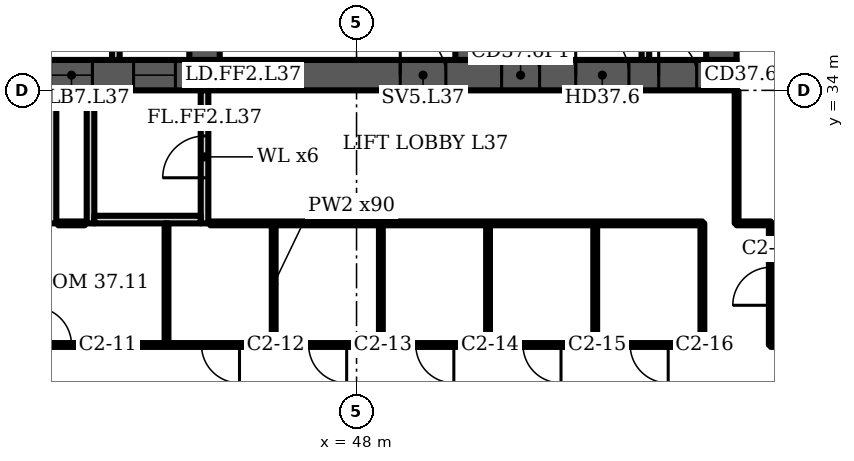
"""IFC4 building model, lengths in metres.
Left out: names, types, materials, properties, quantities, classifications, styles, units other than length and angle.
Written with IfcOpenShell. Run it as: python <this file> out.ifc"""

import sys

from ifc_helpers import new_model, si_unit, direction, frame, frame_2d, origin, place, context, subcontext, project, spatial, polyline, rectangle, outline, extrude, element, fill, save


model = new_model("IFC4")
c1 = context("Model", 3, precision=1e-05, world=origin(), true_north=direction((0.0, 1.0)))
c2 = subcontext(c1, "Body", "Model", "MODEL_VIEW")
j1 = project(units=[si_unit("LENGTHUNIT", "METRE"), si_unit("PLANEANGLEUNIT", "RADIAN")], contexts=[c1])
p1 = place(None, origin())
s1 = spatial("IfcSite", under=j1, at=p1, CompositionType="ELEMENT")
p2 = place(p1, origin())
s2 = spatial("IfcBuilding", under=s1, at=p2, CompositionType="ELEMENT")
p3 = place(p2, frame((0.0, 0.0, 155.5)))
s3 = spatial("IfcBuildingStorey", under=s2, at=p3, CompositionType="ELEMENT", Elevation=155.5)
p4 = place(p3, frame((16.0, 34.4, 0.0), z_axis=(0.0, 0.0, 1.0), x_axis=(1.0, 0.0, 0.0)))
e1 = element("IfcWall", 1, at=p4, inside=s3, PredefinedType="SHEAR", context=c2, shape_type="SweptSolid", body=[
    extrude(rectangle(XDim=42.0, YDim=0.8, at=frame_2d((21.0, 0.0))), origin(), (0.0, 0.0, 1.0), 3.6),
])
p5 = place(p4, frame((1.75, 0.0, 0.0)))
e2 = element("IfcOpeningElement", 2, at=p5, cuts=e1, PredefinedType="OPENING", context=c2, shape_type="SweptSolid", body=[
    extrude(rectangle(XDim=1.0, YDim=2.1, at=frame_2d((0.5, 1.05))), frame((0.0, 0.41, 0.0), z_axis=(0.0, -1.0, 0.0), x_axis=(1.0, 0.0, 0.0)), (0.0, 0.0, 1.0), 0.82),
])
p6 = place(p4, frame((4.65, 0.0, 0.0)))
e3 = element("IfcOpeningElement", 3, at=p6, cuts=e1, PredefinedType="OPENING", context=c2, shape_type="SweptSolid", body=[
    extrude(rectangle(XDim=1.0, YDim=2.1, at=frame_2d((0.5, 1.05))), frame((0.0, 0.41, 0.0), z_axis=(0.0, -1.0, 0.0), x_axis=(1.0, 0.0, 0.0)), (0.0, 0.0, 1.0), 0.82),
])
p7 = place(p4, frame((7.65, 0.0, 0.0)))
e4 = element("IfcOpeningElement", 4, at=p7, cuts=e1, PredefinedType="OPENING", context=c2, shape_type="SweptSolid", body=[
    extrude(rectangle(XDim=1.2, YDim=2.1, at=frame_2d((0.6, 1.05))), frame((0.0, 0.41, 0.0), z_axis=(0.0, -1.0, 0.0), x_axis=(1.0, 0.0, 0.0)), (0.0, 0.0, 1.0), 0.82),
])
p8 = place(p4, frame((14.767, 0.0, 0.0)))
e5 = element("IfcOpeningElement", 5, at=p8, cuts=e1, PredefinedType="OPENING", context=c2, shape_type="SweptSolid", body=[
    extrude(rectangle(XDim=1.1, YDim=2.1, at=frame_2d((0.55, 1.05))), frame((0.0, 0.41, 0.0), z_axis=(0.0, -1.0, 0.0), x_axis=(1.0, 0.0, 0.0)), (0.0, 0.0, 1.0), 0.82),
])
p9 = place(p4, frame((19.133, 0.0, 0.0)))
e6 = element("IfcOpeningElement", 6, at=p9, cuts=e1, PredefinedType="OPENING", context=c2, shape_type="SweptSolid", body=[
    extrude(rectangle(XDim=1.1, YDim=2.1, at=frame_2d((0.55, 1.05))), frame((0.0, 0.41, 0.0), z_axis=(0.0, -1.0, 0.0), x_axis=(1.0, 0.0, 0.0)), (0.0, 0.0, 1.0), 0.82),
])
p10 = place(p4, frame((16.8, 0.0, 0.0)))
e7 = element("IfcOpeningElement", 7, at=p10, cuts=e1, PredefinedType="OPENING", context=c2, shape_type="SweptSolid", body=[
    extrude(rectangle(XDim=1.4, YDim=2.1, at=frame_2d((0.7, 1.05))), frame((0.0, 0.41, 0.0), z_axis=(0.0, -1.0, 0.0), x_axis=(1.0, 0.0, 0.0)), (0.0, 0.0, 1.0), 0.82),
])
p11 = place(p4, frame((21.767, 0.0, 0.0)))
e8 = element("IfcOpeningElement", 8, at=p11, cuts=e1, PredefinedType="OPENING", context=c2, shape_type="SweptSolid", body=[
    extrude(rectangle(XDim=1.1, YDim=2.1, at=frame_2d((0.55, 1.05))), frame((0.0, 0.41, 0.0), z_axis=(0.0, -1.0, 0.0), x_axis=(1.0, 0.0, 0.0)), (0.0, 0.0, 1.0), 0.82),
])
p12 = place(p4, frame((23.95, 0.0, 0.0)))
e9 = element("IfcOpeningElement", 9, at=p12, cuts=e1, PredefinedType="OPENING", context=c2, shape_type="SweptSolid", body=[
    extrude(rectangle(XDim=1.1, YDim=2.1, at=frame_2d((0.55, 1.05))), frame((0.0, 0.41, 0.0), z_axis=(0.0, -1.0, 0.0), x_axis=(1.0, 0.0, 0.0)), (0.0, 0.0, 1.0), 0.82),
])
p13 = place(p4, frame((26.133, 0.0, 0.0)))
e10 = element("IfcOpeningElement", 10, at=p13, cuts=e1, PredefinedType="OPENING", context=c2, shape_type="SweptSolid", body=[
    extrude(rectangle(XDim=1.1, YDim=2.1, at=frame_2d((0.55, 1.05))), frame((0.0, 0.41, 0.0), z_axis=(0.0, -1.0, 0.0), x_axis=(1.0, 0.0, 0.0)), (0.0, 0.0, 1.0), 0.82),
])
p14 = place(p4, frame((33.15, 0.0, 0.0)))
e11 = element("IfcOpeningElement", 11, at=p14, cuts=e1, PredefinedType="OPENING", context=c2, shape_type="SweptSolid", body=[
    extrude(rectangle(XDim=1.2, YDim=2.1, at=frame_2d((0.6, 1.05))), frame((0.0, 0.41, 0.0), z_axis=(0.0, -1.0, 0.0), x_axis=(1.0, 0.0, 0.0)), (0.0, 0.0, 1.0), 0.82),
])
p15 = place(p4, frame((35.817, 0.0, 0.0)))
e12 = element("IfcOpeningElement", 12, at=p15, cuts=e1, PredefinedType="OPENING", context=c2, shape_type="SweptSolid", body=[
    extrude(rectangle(XDim=1.0, YDim=2.1, at=frame_2d((0.5, 1.05))), frame((0.0, 0.41, 0.0), z_axis=(0.0, -1.0, 0.0), x_axis=(1.0, 0.0, 0.0)), (0.0, 0.0, 1.0), 0.82),
])
p16 = place(p4, frame((39.95, 0.0, 0.0)))
e13 = element("IfcOpeningElement", 13, at=p16, cuts=e1, PredefinedType="OPENING", context=c2, shape_type="SweptSolid", body=[
    extrude(rectangle(XDim=1.0, YDim=2.1, at=frame_2d((0.5, 1.05))), frame((0.0, 0.41, 0.0), z_axis=(0.0, -1.0, 0.0), x_axis=(1.0, 0.0, 0.0)), (0.0, 0.0, 1.0), 0.82),
])
p17 = place(p4, frame((37.767, 0.0, 0.0)))
e14 = element("IfcOpeningElement", 14, at=p17, cuts=e1, PredefinedType="OPENING", context=c2, shape_type="SweptSolid", body=[
    extrude(rectangle(XDim=1.4, YDim=2.1, at=frame_2d((0.7, 1.05))), frame((0.0, 0.41, 0.0), z_axis=(0.0, -1.0, 0.0), x_axis=(1.0, 0.0, 0.0)), (0.0, 0.0, 1.0), 0.82),
])
p18 = place(p3, frame((44.0, 34.8, 0.0), z_axis=(0.0, 0.0, 1.0), x_axis=(0.0, 1.0, 0.0)))
e15 = element("IfcWall", 15, at=p18, inside=s3, PredefinedType="SHEAR", context=c2, shape_type="SweptSolid", body=[
    extrude(rectangle(XDim=14.374, YDim=0.8, at=frame_2d((7.187, 0.0))), origin(), (0.0, 0.0, 1.0), 3.6),
])
p19 = place(p18, frame((11.312, 0.0, 0.0)))
e16 = element("IfcOpeningElement", 16, at=p19, cuts=e15, PredefinedType="OPENING", context=c2, shape_type="SweptSolid", body=[
    extrude(rectangle(XDim=1.0, YDim=2.1, at=frame_2d((0.5, 1.05))), frame((0.0, 0.41, 0.0), z_axis=(0.0, -1.0, 0.0), x_axis=(1.0, 0.0, 0.0)), (0.0, 0.0, 1.0), 0.82),
])
p20 = place(p18, frame((3.6, 0.0, 0.0)))
e17 = element("IfcOpeningElement", 17, at=p20, cuts=e15, PredefinedType="OPENING", context=c2, shape_type="SweptSolid", body=[
    extrude(rectangle(XDim=1.1, YDim=2.1, at=frame_2d((0.55, 1.05))), frame((0.0, 0.41, 0.0), z_axis=(0.0, -1.0, 0.0), x_axis=(1.0, 0.0, 0.0)), (0.0, 0.0, 1.0), 0.82),
])
p21 = place(p3, frame((51.0, 34.8, 0.0), z_axis=(0.0, 0.0, 1.0), x_axis=(0.0, 1.0, 0.0)))
e18 = element("IfcWall", 18, at=p21, inside=s3, PredefinedType="SHEAR", context=c2, shape_type="SweptSolid", body=[
    extrude(rectangle(XDim=13.762, YDim=0.8, at=frame_2d((6.881, 0.0))), origin(), (0.0, 0.0, 1.0), 3.6),
])
p22 = place(p21, frame((3.6, 0.0, 0.0)))
e19 = element("IfcOpeningElement", 19, at=p22, cuts=e18, PredefinedType="OPENING", context=c2, shape_type="SweptSolid", body=[
    extrude(rectangle(XDim=1.1, YDim=2.1, at=frame_2d((0.55, 1.05))), frame((0.0, 0.41, 0.0), z_axis=(0.0, -1.0, 0.0), x_axis=(1.0, 0.0, 0.0)), (0.0, 0.0, 1.0), 0.82),
])
p23 = place(p3, frame((57.6, 34.8, 0.0), z_axis=(0.0, 0.0, 1.0), x_axis=(0.0, 1.0, 0.0)))
e20 = element("IfcWall", 20, at=p23, inside=s3, PredefinedType="SHEAR", context=c2, shape_type="SweptSolid", body=[
    extrude(rectangle(XDim=13.184, YDim=0.8, at=frame_2d((6.592, 0.0))), origin(), (0.0, 0.0, 1.0), 3.6),
])
p24 = place(p3, frame((0.0, 0.0, -0.0)))
e21 = element("IfcWall", 21, at=p24, inside=s3, PredefinedType="PARTITIONING", context=c2, shape_type="SweptSolid", body=[
    extrude(outline(polyline([(41.567, 37.1), (39.433, 37.1), (39.433, 34.8), (39.233, 34.8), (39.233, 37.65), (37.4, 37.65), (37.4, 37.85), (39.233, 37.85), (39.433, 37.85), (39.433, 37.3), (41.567, 37.3), (41.567, 37.55), (41.767, 37.55), (43.6, 37.55), (43.6, 37.35), (41.767, 37.35), (41.767, 34.8), (41.567, 34.8), (41.567, 37.1)])), origin(), (0.0, 0.0, 1.0), 3.2),
])
p25 = place(p3, frame((0.0, 0.0, -0.0)))
e22 = element("IfcWall", 22, at=p25, inside=s3, PredefinedType="PARTITIONING", context=c2, shape_type="SweptSolid", body=[
    extrude(outline(polyline([(53.233, 34.8), (53.233, 37.3), (53.433, 37.3), (53.433, 34.8), (53.233, 34.8)])), origin(), (0.0, 0.0, 1.0), 3.2),
])
p26 = place(p3, frame((0.0, 0.0, -0.0)))
e23 = element("IfcWall", 23, at=p26, inside=s3, PredefinedType="PARTITIONING", context=c2, shape_type="SweptSolid", body=[
    extrude(outline(polyline([(55.5, 34.8), (55.5, 37.3), (55.7, 37.3), (55.7, 34.8), (55.5, 34.8)])), origin(), (0.0, 0.0, 1.0), 3.2),
])
for number, where, z_axis, x_axis in (
    (24, (40.0, 30.5, 0.0), (0.0, 0.0, 1.0), (0.0, 1.0, 0.0)),
    (25, (41.0, 30.5, 0.0), (0.0, 0.0, 1.0), (0.0, 1.0, 0.0)),
):
    element("IfcWall", number, at=place(p3, frame(where, z_axis=z_axis, x_axis=x_axis)), inside=s3, PredefinedType="PARTITIONING", context=c2, shape_type="SweptSolid", body=[
        extrude(rectangle(XDim=3.5, YDim=0.2, at=frame_2d((1.75, 0.0))), origin(), (0.0, 0.0, 1.0), 3.2),
    ])
p27 = place(p3, frame((44.0, 30.5, 0.0), z_axis=(0.0, 0.0, 1.0), x_axis=(0.0, 1.0, 0.0)))
e26 = element("IfcWall", 26, at=p27, inside=s3, PredefinedType="PARTITIONING", context=c2, shape_type="SweptSolid", body=[
    extrude(rectangle(XDim=3.5, YDim=0.2, at=frame_2d((1.75, 0.0))), origin(), (0.0, 0.0, 1.0), 3.2),
])
p28 = place(p27, frame((1.2, 0.0, 0.0)))
e27 = element("IfcOpeningElement", 27, at=p28, cuts=e26, PredefinedType="OPENING", context=c2, shape_type="SweptSolid", body=[
    extrude(rectangle(XDim=1.1, YDim=2.1, at=frame_2d((0.55, 1.05))), frame((0.0, 0.11, 0.0), z_axis=(0.0, -1.0, 0.0), x_axis=(1.0, 0.0, 0.0)), (0.0, 0.0, 1.0), 0.22),
])
p29 = place(p3, frame((41.1, 30.6, 0.0), z_axis=(0.0, 0.0, 1.0), x_axis=(1.0, 0.0, 0.0)))
e28 = element("IfcWall", 28, at=p29, inside=s3, PredefinedType="PARTITIONING", context=c2, shape_type="SweptSolid", body=[
    extrude(rectangle(XDim=2.8, YDim=0.2, at=frame_2d((1.4, 0.0))), origin(), (0.0, 0.0, 1.0), 3.2),
])
p30 = place(p3, frame((23.2, 27.3, 0.0), z_axis=(0.0, 0.0, 1.0), x_axis=(1.0, 0.0, 0.0)))
e29 = element("IfcWall", 29, at=p30, inside=s3, PredefinedType="PARTITIONING", context=c2, shape_type="SweptSolid", body=[
    extrude(rectangle(XDim=33.9, YDim=0.1, at=frame_2d((16.95, 0.0))), origin(), (0.0, 0.0, 1.0), 3.2),
])
p31 = place(p30, frame((16.3, 0.0, 0.0)))
e30 = element("IfcOpeningElement", 30, at=p31, cuts=e29, PredefinedType="OPENING", context=c2, shape_type="SweptSolid", body=[
    extrude(rectangle(XDim=1.0, YDim=2.1, at=frame_2d((0.5, 1.05))), frame((0.0, 0.06, 0.0), z_axis=(0.0, -1.0, 0.0), x_axis=(1.0, 0.0, 0.0)), (0.0, 0.0, 1.0), 0.12),
])
p32 = place(p30, frame((20.72, 0.0, 0.0)))
e31 = element("IfcOpeningElement", 31, at=p32, cuts=e29, PredefinedType="OPENING", context=c2, shape_type="SweptSolid", body=[
    extrude(rectangle(XDim=1.0, YDim=2.1, at=frame_2d((0.5, 1.05))), frame((0.0, 0.06, 0.0), z_axis=(0.0, -1.0, 0.0), x_axis=(1.0, 0.0, 0.0)), (0.0, 0.0, 1.0), 0.12),
])
p33 = place(p30, frame((23.54, 0.0, 0.0)))
e32 = element("IfcOpeningElement", 32, at=p33, cuts=e29, PredefinedType="OPENING", context=c2, shape_type="SweptSolid", body=[
    extrude(rectangle(XDim=1.0, YDim=2.1, at=frame_2d((0.5, 1.05))), frame((0.0, 0.06, 0.0), z_axis=(0.0, -1.0, 0.0), x_axis=(1.0, 0.0, 0.0)), (0.0, 0.0, 1.0), 0.12),
])
p34 = place(p30, frame((26.36, 0.0, 0.0)))
e33 = element("IfcOpeningElement", 33, at=p34, cuts=e29, PredefinedType="OPENING", context=c2, shape_type="SweptSolid", body=[
    extrude(rectangle(XDim=1.0, YDim=2.1, at=frame_2d((0.5, 1.05))), frame((0.0, 0.06, 0.0), z_axis=(0.0, -1.0, 0.0), x_axis=(1.0, 0.0, 0.0)), (0.0, 0.0, 1.0), 0.12),
])
p35 = place(p30, frame((29.18, 0.0, 0.0)))
e34 = element("IfcOpeningElement", 34, at=p35, cuts=e29, PredefinedType="OPENING", context=c2, shape_type="SweptSolid", body=[
    extrude(rectangle(XDim=1.0, YDim=2.1, at=frame_2d((0.5, 1.05))), frame((0.0, 0.06, 0.0), z_axis=(0.0, -1.0, 0.0), x_axis=(1.0, 0.0, 0.0)), (0.0, 0.0, 1.0), 0.12),
])
p36 = place(p30, frame((32.0, 0.0, 0.0)))
e35 = element("IfcOpeningElement", 35, at=p36, cuts=e29, PredefinedType="OPENING", context=c2, shape_type="SweptSolid", body=[
    extrude(rectangle(XDim=1.0, YDim=2.1, at=frame_2d((0.5, 1.05))), frame((0.0, 0.06, 0.0), z_axis=(0.0, -1.0, 0.0), x_axis=(1.0, 0.0, 0.0)), (0.0, 0.0, 1.0), 0.12),
])
for number, where, z_axis, x_axis in (
    (36, (43.0, 27.3, 0.0), (0.0, 0.0, 1.0), (0.0, 1.0, 0.0)),
    (37, (45.82, 27.3, 0.0), (0.0, 0.0, 1.0), (0.0, 1.0, 0.0)),
    (38, (48.64, 27.3, 0.0), (0.0, 0.0, 1.0), (0.0, 1.0, 0.0)),
    (39, (51.46, 27.3, 0.0), (0.0, 0.0, 1.0), (0.0, 1.0, 0.0)),
    (40, (54.28, 27.3, 0.0), (0.0, 0.0, 1.0), (0.0, 1.0, 0.0)),
    (41, (57.1, 27.3, 0.0), (0.0, 0.0, 1.0), (0.0, 1.0, 0.0)),
):
    element("IfcWall", number, at=place(p3, frame(where, z_axis=z_axis, x_axis=x_axis)), inside=s3, PredefinedType="PARTITIONING", context=c2, shape_type="SweptSolid", body=[
        extrude(rectangle(XDim=3.2, YDim=0.1, at=frame_2d((1.6, 0.0))), origin(), (0.0, 0.0, 1.0), 3.2),
    ])
p37 = place(p3, frame((58.0, 30.5, 0.0), z_axis=(0.0, 0.0, 1.0), x_axis=(0.0, 1.0, 0.0)))
e42 = element("IfcWall", 42, at=p37, inside=s3, PredefinedType="PARTITIONING", context=c2, shape_type="SweptSolid", body=[
    extrude(rectangle(XDim=3.48, YDim=0.1, at=frame_2d((1.74, 0.0))), origin(), (0.0, 0.0, 1.0), 3.2),
])
p38 = place(p3, frame((58.0, 30.5, 0.0), z_axis=(0.0, 0.0, 1.0), x_axis=(1.0, 0.0, 0.0)))
e43 = element("IfcWall", 43, at=p38, inside=s3, PredefinedType="PARTITIONING", context=c2, shape_type="SweptSolid", body=[
    extrude(rectangle(XDim=0.9, YDim=0.1, at=frame_2d((0.45, 0.0))), origin(), (0.0, 0.0, 1.0), 3.2),
])
p39 = place(p3, frame((58.9, 27.3, 0.0), z_axis=(0.0, 0.0, 1.0), x_axis=(0.0, 1.0, 0.0)))
e44 = element("IfcWall", 44, at=p39, inside=s3, PredefinedType="PARTITIONING", context=c2, shape_type="SweptSolid", body=[
    extrude(rectangle(XDim=3.2, YDim=0.1, at=frame_2d((1.6, 0.0))), origin(), (0.0, 0.0, 1.0), 3.2),
])
p40 = place(p39, frame((1.045, 0.0, 0.0)))
e45 = element("IfcOpeningElement", 45, at=p40, cuts=e44, PredefinedType="OPENING", context=c2, shape_type="SweptSolid", body=[
    extrude(rectangle(XDim=1.0, YDim=2.1, at=frame_2d((0.5, 1.05))), frame((0.0, 0.06, 0.0), z_axis=(0.0, -1.0, 0.0), x_axis=(1.0, 0.0, 0.0)), (0.0, 0.0, 1.0), 0.12),
])
p41 = place(p3, frame((58.9, 27.3, 0.0), z_axis=(0.0, 0.0, 1.0), x_axis=(1.0, 0.0, 0.0)))
e46 = element("IfcWall", 46, at=p41, inside=s3, PredefinedType="PARTITIONING", context=c2, shape_type="SweptSolid", body=[
    extrude(rectangle(XDim=4.555, YDim=0.1, at=frame_2d((2.278, 0.0))), origin(), (0.0, 0.0, 1.0), 3.2),
])
p42 = place(p3, frame((40.15, 30.5, 0.0), z_axis=(0.0, 0.0, 1.0), x_axis=(1.0, 0.0, 0.0)))
e47 = element("IfcWall", 47, at=p42, inside=s3, PredefinedType="PARTITIONING", context=c2, shape_type="SweptSolid", body=[
    extrude(rectangle(XDim=0.7, YDim=0.1, at=frame_2d((0.35, 0.0))), origin(), (0.0, 0.0, 1.0), 3.2),
])
p43 = place(p3, frame((44.15, 30.5, 0.0), z_axis=(0.0, 0.0, 1.0), x_axis=(1.0, 0.0, 0.0)))
e48 = element("IfcWall", 48, at=p43, inside=s3, PredefinedType="PARTITIONING", context=c2, shape_type="SweptSolid", body=[
    extrude(rectangle(XDim=12.95, YDim=0.1, at=frame_2d((6.475, 0.0))), origin(), (0.0, 0.0, 1.0), 3.2),
])
p44 = place(p12, origin())
e49 = element("IfcDoor", 49, at=p44, inside=s3, OperationType="DOUBLE_DOOR_SLIDING", PredefinedType="DOOR", context=c2, shape_type="SweptSolid", body=[
    extrude(rectangle(XDim=1.1, YDim=2.1, at=frame_2d((0.55, 1.05))), frame((0.0, 0.025, 0.0), z_axis=(0.0, -1.0, 0.0), x_axis=(1.0, 0.0, 0.0)), (0.0, 0.0, 1.0), 0.05),
])
fill(e9, e49)
p45 = place(p13, origin())
e50 = element("IfcDoor", 50, at=p45, inside=s3, OperationType="DOUBLE_DOOR_SLIDING", PredefinedType="DOOR", context=c2, shape_type="SweptSolid", body=[
    extrude(rectangle(XDim=1.1, YDim=2.1, at=frame_2d((0.55, 1.05))), frame((0.0, 0.025, 0.0), z_axis=(0.0, -1.0, 0.0), x_axis=(1.0, 0.0, 0.0)), (0.0, 0.0, 1.0), 0.05),
])
fill(e10, e50)
p46 = place(p14, origin())
e51 = element("IfcDoor", 51, at=p46, inside=s3, OperationType="SINGLE_SWING_LEFT", PredefinedType="DOOR", context=c2, shape_type="SweptSolid", body=[
    extrude(rectangle(XDim=1.2, YDim=2.1, at=frame_2d((0.6, 1.05))), frame((0.0, 0.025, 0.0), z_axis=(0.0, -1.0, 0.0), x_axis=(1.0, 0.0, 0.0)), (0.0, 0.0, 1.0), 0.05),
])
fill(e11, e51)
p47 = place(p15, origin())
e52 = element("IfcDoor", 52, at=p47, inside=s3, OperationType="SINGLE_SWING_LEFT", PredefinedType="DOOR", context=c2, shape_type="SweptSolid", body=[
    extrude(rectangle(XDim=1.0, YDim=2.1, at=frame_2d((0.5, 1.05))), frame((0.0, 0.4, 0.0), z_axis=(0.0, -1.0, 0.0), x_axis=(1.0, 0.0, 0.0)), (0.0, 0.0, 1.0), 0.8),
])
fill(e12, e52)
p48 = place(p16, origin())
e53 = element("IfcDoor", 53, at=p48, inside=s3, OperationType="SINGLE_SWING_LEFT", PredefinedType="DOOR", context=c2, shape_type="SweptSolid", body=[
    extrude(rectangle(XDim=1.0, YDim=2.1, at=frame_2d((0.5, 1.05))), frame((0.0, 0.4, 0.0), z_axis=(0.0, -1.0, 0.0), x_axis=(1.0, 0.0, 0.0)), (0.0, 0.0, 1.0), 0.8),
])
fill(e13, e53)
p49 = place(p17, origin())
e54 = element("IfcDoor", 54, at=p49, inside=s3, OperationType="DOUBLE_DOOR_SINGLE_SWING", PredefinedType="DOOR", context=c2, shape_type="SweptSolid", body=[
    extrude(rectangle(XDim=1.4, YDim=2.1, at=frame_2d((0.7, 1.05))), frame((0.0, 0.025, 0.0), z_axis=(0.0, -1.0, 0.0), x_axis=(1.0, 0.0, 0.0)), (0.0, 0.0, 1.0), 0.05),
])
fill(e14, e54)
p50 = place(p28, origin())
e55 = element("IfcDoor", 55, at=p50, inside=s3, OperationType="SINGLE_SWING_LEFT", PredefinedType="DOOR", context=c2, shape_type="SweptSolid", body=[
    extrude(rectangle(XDim=1.1, YDim=2.1, at=frame_2d((0.55, 1.05))), frame((0.0, 0.025, 0.0), z_axis=(0.0, -1.0, 0.0), x_axis=(1.0, 0.0, 0.0)), (0.0, 0.0, 1.0), 0.05),
])
fill(e27, e55)
p51 = place(p31, origin())
e56 = element("IfcDoor", 56, at=p51, inside=s3, OperationType="SINGLE_SWING_LEFT", PredefinedType="DOOR", context=c2, shape_type="SweptSolid", body=[
    extrude(rectangle(XDim=1.0, YDim=2.1, at=frame_2d((0.5, 1.05))), frame((0.0, 0.025, 0.0), z_axis=(0.0, -1.0, 0.0), x_axis=(1.0, 0.0, 0.0)), (0.0, 0.0, 1.0), 0.05),
])
fill(e30, e56)
p52 = place(p32, origin())
e57 = element("IfcDoor", 57, at=p52, inside=s3, OperationType="SINGLE_SWING_RIGHT", PredefinedType="DOOR", context=c2, shape_type="SweptSolid", body=[
    extrude(rectangle(XDim=1.0, YDim=2.1, at=frame_2d((0.5, 1.05))), frame((0.0, 0.025, 0.0), z_axis=(0.0, -1.0, 0.0), x_axis=(1.0, 0.0, 0.0)), (0.0, 0.0, 1.0), 0.05),
])
fill(e31, e57)
p53 = place(p33, origin())
e58 = element("IfcDoor", 58, at=p53, inside=s3, OperationType="SINGLE_SWING_RIGHT", PredefinedType="DOOR", context=c2, shape_type="SweptSolid", body=[
    extrude(rectangle(XDim=1.0, YDim=2.1, at=frame_2d((0.5, 1.05))), frame((0.0, 0.025, 0.0), z_axis=(0.0, -1.0, 0.0), x_axis=(1.0, 0.0, 0.0)), (0.0, 0.0, 1.0), 0.05),
])
fill(e32, e58)
p54 = place(p34, origin())
e59 = element("IfcDoor", 59, at=p54, inside=s3, OperationType="SINGLE_SWING_RIGHT", PredefinedType="DOOR", context=c2, shape_type="SweptSolid", body=[
    extrude(rectangle(XDim=1.0, YDim=2.1, at=frame_2d((0.5, 1.05))), frame((0.0, 0.025, 0.0), z_axis=(0.0, -1.0, 0.0), x_axis=(1.0, 0.0, 0.0)), (0.0, 0.0, 1.0), 0.05),
])
fill(e33, e59)
p55 = place(p35, origin())
e60 = element("IfcDoor", 60, at=p55, inside=s3, OperationType="SINGLE_SWING_RIGHT", PredefinedType="DOOR", context=c2, shape_type="SweptSolid", body=[
    extrude(rectangle(XDim=1.0, YDim=2.1, at=frame_2d((0.5, 1.05))), frame((0.0, 0.025, 0.0), z_axis=(0.0, -1.0, 0.0), x_axis=(1.0, 0.0, 0.0)), (0.0, 0.0, 1.0), 0.05),
])
fill(e34, e60)
p56 = place(p36, origin())
e61 = element("IfcDoor", 61, at=p56, inside=s3, OperationType="SINGLE_SWING_RIGHT", PredefinedType="DOOR", context=c2, shape_type="SweptSolid", body=[
    extrude(rectangle(XDim=1.0, YDim=2.1, at=frame_2d((0.5, 1.05))), frame((0.0, 0.025, 0.0), z_axis=(0.0, -1.0, 0.0), x_axis=(1.0, 0.0, 0.0)), (0.0, 0.0, 1.0), 0.05),
])
fill(e35, e61)
p57 = place(p40, origin())
e62 = element("IfcDoor", 62, at=p57, inside=s3, OperationType="SINGLE_SWING_LEFT", PredefinedType="DOOR", context=c2, shape_type="SweptSolid", body=[
    extrude(rectangle(XDim=1.0, YDim=2.1, at=frame_2d((0.5, 1.05))), frame((0.0, 0.025, 0.0), z_axis=(0.0, -1.0, 0.0), x_axis=(1.0, 0.0, 0.0)), (0.0, 0.0, 1.0), 0.05),
])
fill(e45, e62)
save(model, sys.argv[1])
